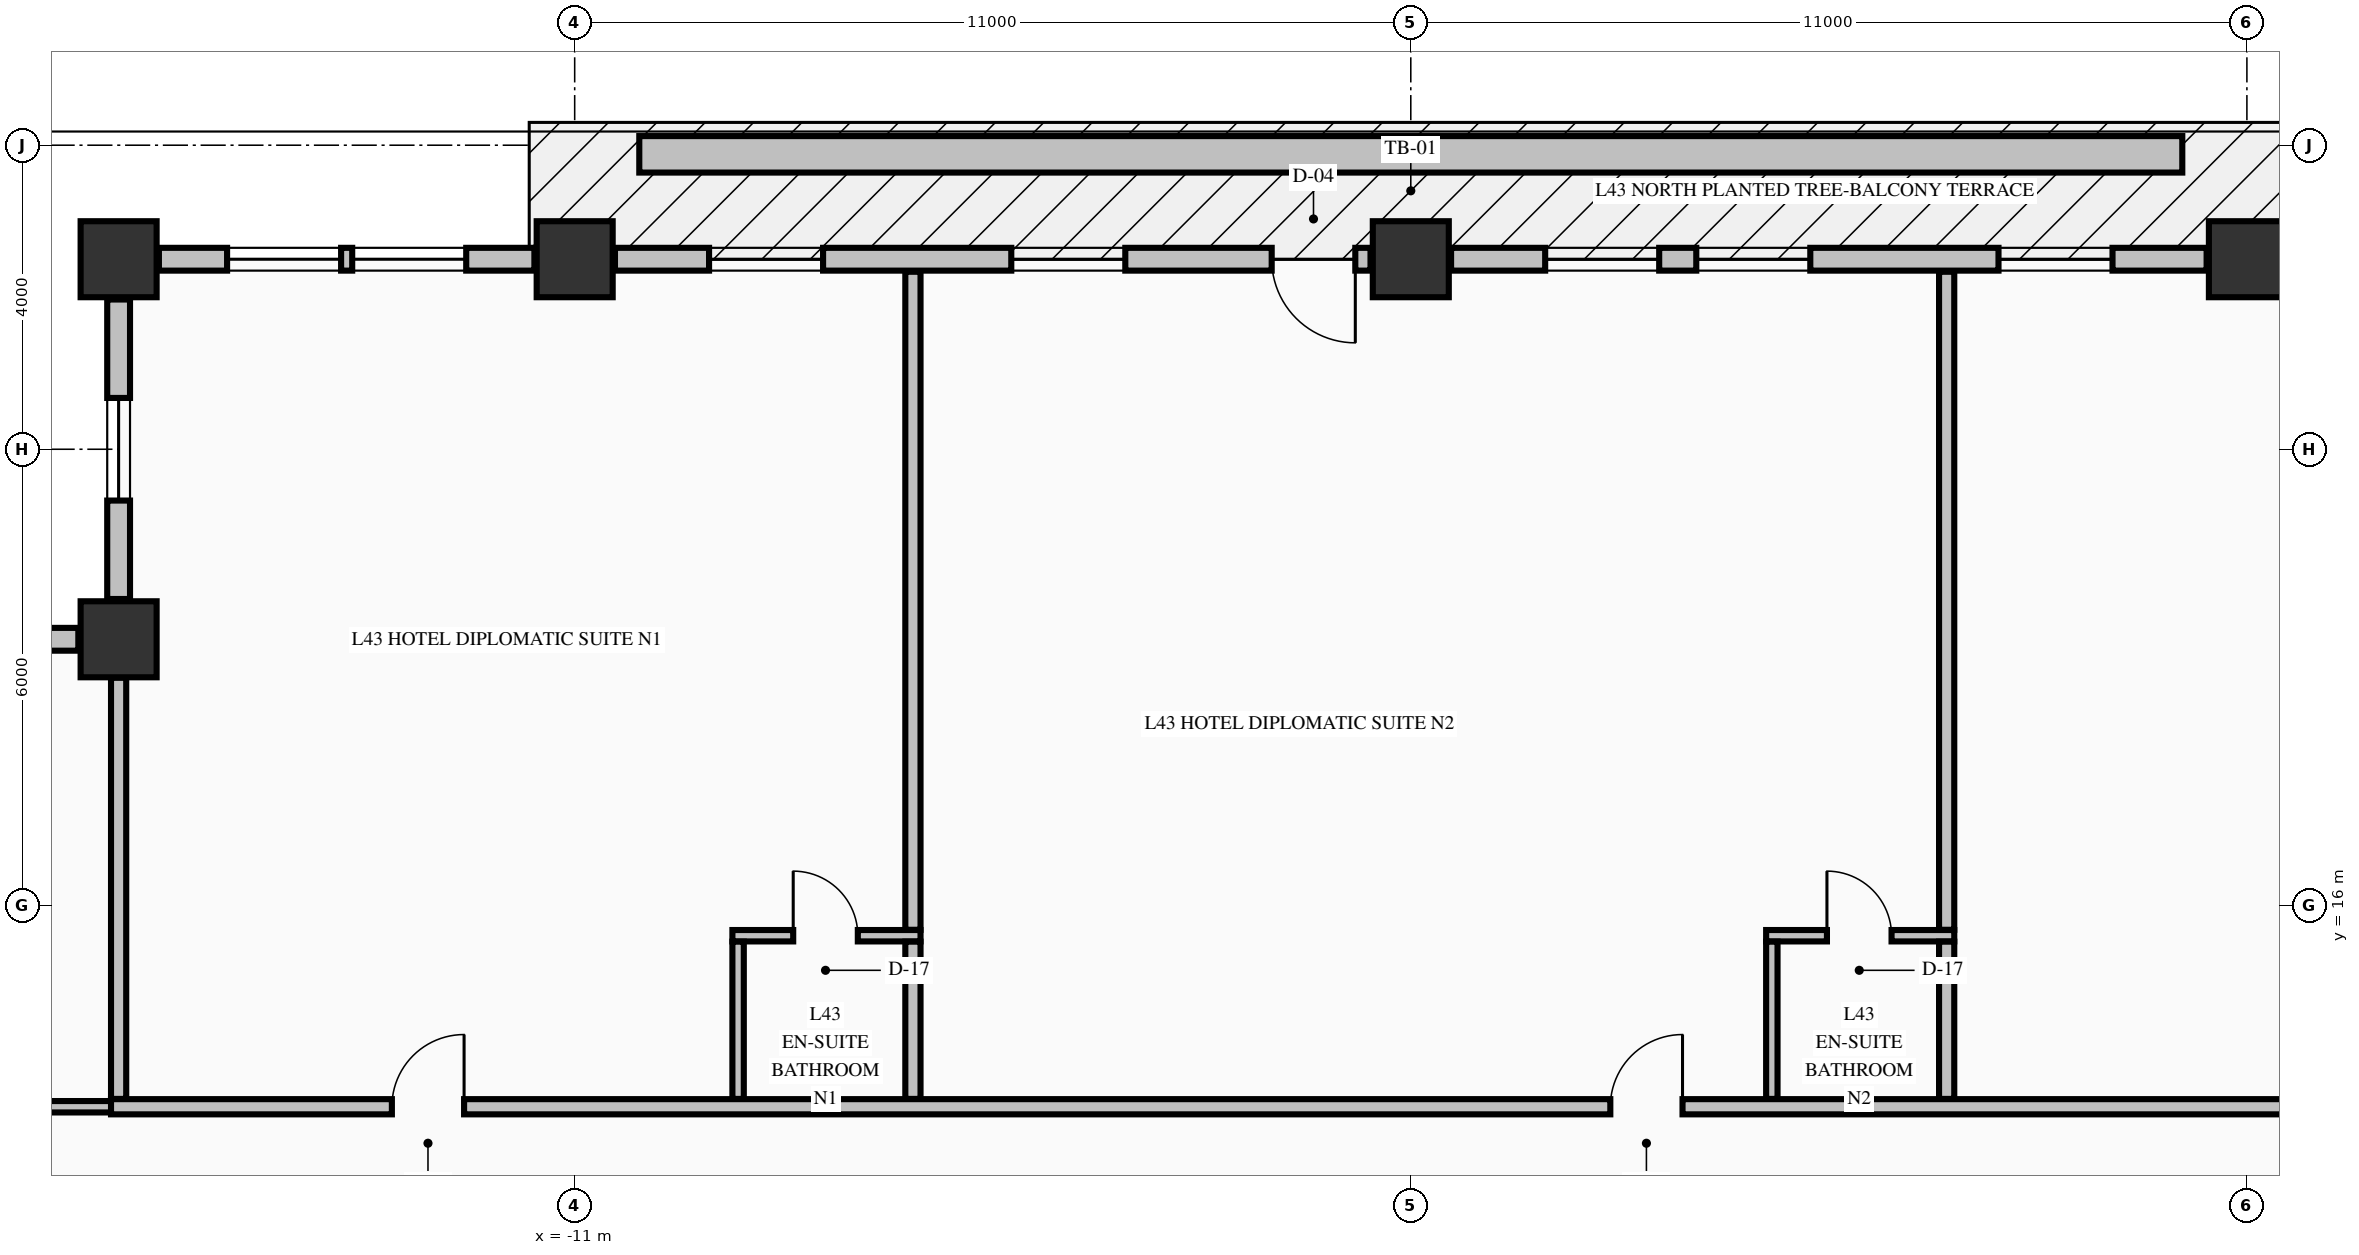
"""IFC4 building model, lengths in metres.
Left out: names, types, materials, properties, quantities, classifications, styles, units other than length and angle.
Written with IfcOpenShell. Run it as: python <this file> out.ifc"""

import sys

from ifc_helpers import new_model, si_unit, direction, frame, frame_2d, origin, origin_2d, place, context, subcontext, project, spatial, rectangle, extrude, element, fill, save


model = new_model("IFC4")
c1 = context("Model", 3, precision=1e-05, world=origin(), true_north=direction((0.0, 1.0)))
c2 = subcontext(c1, "Body", "Model", "MODEL_VIEW")
j1 = project(units=[si_unit("LENGTHUNIT", "METRE"), si_unit("PLANEANGLEUNIT", "RADIAN")], contexts=[c1])
p1 = place(None, origin())
s1 = spatial("IfcSite", under=j1, at=p1, CompositionType="ELEMENT")
p2 = place(p1, origin())
s2 = spatial("IfcBuilding", under=s1, at=p2, CompositionType="ELEMENT")
p3 = place(p2, frame((0.0, 0.0, 169.46)))
s3 = spatial("IfcBuildingStorey", under=s2, at=p3, CompositionType="ELEMENT", Elevation=169.46)
for number, where, z_axis, x_axis in (
    (1, (-17.0, 24.5, -0.25), (0.0, 0.0, 1.0), (1.0, 0.0, 0.0)),
    (2, (-11.0, 24.5, -0.25), (0.0, 0.0, 1.0), (1.0, 0.0, 0.0)),
    (3, (0.0, 24.5, -0.25), (0.0, 0.0, 1.0), (1.0, 0.0, 0.0)),
    (4, (11.0, 24.5, -0.25), (0.0, 0.0, 1.0), (1.0, 0.0, 0.0)),
    (5, (-17.0, 19.5, -0.25), (0.0, 0.0, 1.0), (1.0, 0.0, 0.0)),
):
    element("IfcColumn", number, at=place(p3, frame(where, z_axis=z_axis, x_axis=x_axis)), inside=s3, PredefinedType="COLUMN", context=c2, shape_type="SweptSolid", body=[
        extrude(rectangle(XDim=1.0, YDim=1.0, at=origin_2d()), origin(), (0.0, 0.0, 1.0), 3.4),
    ])
p4 = place(p3, frame((-17.0, 23.97, 0.0), z_axis=(0.0, 0.0, 1.0), x_axis=(0.0, -1.0, 0.0)))
e6 = element("IfcWall", 6, at=p4, inside=s3, PredefinedType="STANDARD", context=c2, shape_type="SweptSolid", body=[
    extrude(rectangle(XDim=3.94, YDim=0.3, at=frame_2d((1.97, 0.0))), origin(), (0.0, 0.0, 1.0), 2.542),
])
p5 = place(p4, frame((1.295, 0.0, 0.68)))
e7 = element("IfcOpeningElement", 7, at=p5, cuts=e6, PredefinedType="OPENING", context=c2, shape_type="SweptSolid", body=[
    extrude(rectangle(XDim=1.35, YDim=1.42, at=frame_2d((0.675, 0.71))), frame((0.0, 0.16, 0.0), z_axis=(0.0, -1.0, 0.0), x_axis=(1.0, 0.0, 0.0)), (0.0, 0.0, 1.0), 0.32),
])
p6 = place(p3, frame((-17.53, 19.5, 0.0), z_axis=(0.0, 0.0, 1.0), x_axis=(-1.0, 0.0, 0.0)))
e8 = element("IfcWall", 8, at=p6, inside=s3, PredefinedType="STANDARD", context=c2, shape_type="SweptSolid", body=[
    extrude(rectangle(XDim=3.94, YDim=0.3, at=frame_2d((1.97, 0.0))), origin(), (0.0, 0.0, 1.0), 2.542),
])
p7 = place(p6, frame((1.295, 0.0, 0.68)))
e9 = element("IfcOpeningElement", 9, at=p7, cuts=e8, PredefinedType="OPENING", context=c2, shape_type="SweptSolid", body=[
    extrude(rectangle(XDim=1.35, YDim=1.42, at=frame_2d((0.675, 0.71))), frame((0.0, 0.16, 0.0), z_axis=(0.0, -1.0, 0.0), x_axis=(1.0, 0.0, 0.0)), (0.0, 0.0, 1.0), 0.32),
])
p8 = place(p3, frame((-11.53, 24.5, 0.0), z_axis=(0.0, 0.0, 1.0), x_axis=(-1.0, 0.0, 0.0)))
e10 = element("IfcWall", 10, at=p8, inside=s3, PredefinedType="STANDARD", context=c2, shape_type="SweptSolid", body=[
    extrude(rectangle(XDim=4.94, YDim=0.3, at=frame_2d((2.47, 0.0))), origin(), (0.0, 0.0, 1.0), 2.542),
])
p9 = place(p8, frame((0.897, 0.0, 0.72)))
e11 = element("IfcOpeningElement", 11, at=p9, cuts=e10, PredefinedType="OPENING", context=c2, shape_type="SweptSolid", body=[
    extrude(rectangle(XDim=1.5, YDim=1.6, at=frame_2d((0.75, 0.8))), frame((0.0, 0.16, 0.0), z_axis=(0.0, -1.0, 0.0), x_axis=(1.0, 0.0, 0.0)), (0.0, 0.0, 1.0), 0.32),
])
p10 = place(p8, frame((2.543, 0.0, 0.72)))
e12 = element("IfcOpeningElement", 12, at=p10, cuts=e10, PredefinedType="OPENING", context=c2, shape_type="SweptSolid", body=[
    extrude(rectangle(XDim=1.5, YDim=1.6, at=frame_2d((0.75, 0.8))), frame((0.0, 0.16, 0.0), z_axis=(0.0, -1.0, 0.0), x_axis=(1.0, 0.0, 0.0)), (0.0, 0.0, 1.0), 0.32),
])
p11 = place(p3, frame((-0.53, 24.5, 0.0), z_axis=(0.0, 0.0, 1.0), x_axis=(-1.0, 0.0, 0.0)))
e13 = element("IfcWall", 13, at=p11, inside=s3, PredefinedType="STANDARD", context=c2, shape_type="SweptSolid", body=[
    extrude(rectangle(XDim=9.94, YDim=0.3, at=frame_2d((4.97, 0.0))), origin(), (0.0, 0.0, 1.0), 2.542),
])
p12 = place(p11, frame((0.2, 0.0, 0.0)))
e14 = element("IfcOpeningElement", 14, at=p12, cuts=e13, PredefinedType="OPENING", context=c2, shape_type="SweptSolid", body=[
    extrude(rectangle(XDim=1.1, YDim=2.15, at=frame_2d((0.55, 1.075))), frame((0.0, 0.16, 0.0), z_axis=(0.0, -1.0, 0.0), x_axis=(1.0, 0.0, 0.0)), (0.0, 0.0, 1.0), 0.32),
])
p13 = place(p11, frame((3.226, 0.0, 0.72)))
e15 = element("IfcOpeningElement", 15, at=p13, cuts=e13, PredefinedType="OPENING", context=c2, shape_type="SweptSolid", body=[
    extrude(rectangle(XDim=1.5, YDim=1.6, at=frame_2d((0.75, 0.8))), frame((0.0, 0.16, 0.0), z_axis=(0.0, -1.0, 0.0), x_axis=(1.0, 0.0, 0.0)), (0.0, 0.0, 1.0), 0.32),
])
p14 = place(p11, frame((7.202, 0.0, 0.72)))
e16 = element("IfcOpeningElement", 16, at=p14, cuts=e13, PredefinedType="OPENING", context=c2, shape_type="SweptSolid", body=[
    extrude(rectangle(XDim=1.5, YDim=1.6, at=frame_2d((0.75, 0.8))), frame((0.0, 0.16, 0.0), z_axis=(0.0, -1.0, 0.0), x_axis=(1.0, 0.0, 0.0)), (0.0, 0.0, 1.0), 0.32),
])
p15 = place(p3, frame((10.47, 24.5, 0.0), z_axis=(0.0, 0.0, 1.0), x_axis=(-1.0, 0.0, 0.0)))
e17 = element("IfcWall", 17, at=p15, inside=s3, PredefinedType="STANDARD", context=c2, shape_type="SweptSolid", body=[
    extrude(rectangle(XDim=9.94, YDim=0.3, at=frame_2d((4.97, 0.0))), origin(), (0.0, 0.0, 1.0), 2.542),
])
p16 = place(p15, frame((1.238, 0.0, 0.72)))
e18 = element("IfcOpeningElement", 18, at=p16, cuts=e17, PredefinedType="OPENING", context=c2, shape_type="SweptSolid", body=[
    extrude(rectangle(XDim=1.5, YDim=1.6, at=frame_2d((0.75, 0.8))), frame((0.0, 0.16, 0.0), z_axis=(0.0, -1.0, 0.0), x_axis=(1.0, 0.0, 0.0)), (0.0, 0.0, 1.0), 0.32),
])
p17 = place(p15, frame((5.214, 0.0, 0.72)))
e19 = element("IfcOpeningElement", 19, at=p17, cuts=e17, PredefinedType="OPENING", context=c2, shape_type="SweptSolid", body=[
    extrude(rectangle(XDim=1.5, YDim=1.6, at=frame_2d((0.75, 0.8))), frame((0.0, 0.16, 0.0), z_axis=(0.0, -1.0, 0.0), x_axis=(1.0, 0.0, 0.0)), (0.0, 0.0, 1.0), 0.32),
])
p18 = place(p15, frame((7.202, 0.0, 0.72)))
e20 = element("IfcOpeningElement", 20, at=p18, cuts=e17, PredefinedType="OPENING", context=c2, shape_type="SweptSolid", body=[
    extrude(rectangle(XDim=1.5, YDim=1.6, at=frame_2d((0.75, 0.8))), frame((0.0, 0.16, 0.0), z_axis=(0.0, -1.0, 0.0), x_axis=(1.0, 0.0, 0.0)), (0.0, 0.0, 1.0), 0.32),
])
p19 = place(p3, frame((-20.075, 13.35, 0.0), z_axis=(0.0, 0.0, 1.0), x_axis=(1.0, 0.0, 0.0)))
e21 = element("IfcWall", 21, at=p19, inside=s3, PredefinedType="PARTITIONING", context=c2, shape_type="SweptSolid", body=[
    extrude(rectangle(XDim=3.175, YDim=0.15, at=frame_2d((1.587, 0.0))), origin(), (0.0, 0.0, 1.0), 3.15),
])
p20 = place(p3, frame((-17.1, 13.35, 0.0), z_axis=(0.0, 0.0, 1.0), x_axis=(1.0, 0.0, 0.0)))
e22 = element("IfcWall", 22, at=p20, inside=s3, PredefinedType="PARTITIONING", context=c2, shape_type="SweptSolid", body=[
    extrude(rectangle(XDim=39.2, YDim=0.2, at=frame_2d((19.6, 0.0))), origin(), (0.0, 0.0, 1.0), 3.15),
])
p21 = place(p20, frame((3.695, 0.0, 0.0)))
e23 = element("IfcOpeningElement", 23, at=p21, cuts=e22, PredefinedType="OPENING", context=c2, shape_type="SweptSolid", body=[
    extrude(rectangle(XDim=0.95, YDim=2.15, at=frame_2d((0.475, 1.075))), frame((0.0, 0.11, 0.0), z_axis=(0.0, -1.0, 0.0), x_axis=(1.0, 0.0, 0.0)), (0.0, 0.0, 1.0), 0.22),
])
p22 = place(p20, frame((19.725, 0.0, 0.0)))
e24 = element("IfcOpeningElement", 24, at=p22, cuts=e22, PredefinedType="OPENING", context=c2, shape_type="SweptSolid", body=[
    extrude(rectangle(XDim=0.95, YDim=2.15, at=frame_2d((0.475, 1.075))), frame((0.0, 0.11, 0.0), z_axis=(0.0, -1.0, 0.0), x_axis=(1.0, 0.0, 0.0)), (0.0, 0.0, 1.0), 0.22),
])
p23 = place(p20, frame((30.005, 0.0, 0.0)))
e25 = element("IfcOpeningElement", 25, at=p23, cuts=e22, PredefinedType="OPENING", context=c2, shape_type="SweptSolid", body=[
    extrude(rectangle(XDim=0.95, YDim=2.15, at=frame_2d((0.475, 1.075))), frame((0.0, 0.11, 0.0), z_axis=(0.0, -1.0, 0.0), x_axis=(1.0, 0.0, 0.0)), (0.0, 0.0, 1.0), 0.22),
])
p24 = place(p3, frame((-8.925, 15.6, 0.0), z_axis=(0.0, 0.0, 1.0), x_axis=(1.0, 0.0, 0.0)))
e26 = element("IfcWall", 26, at=p24, inside=s3, PredefinedType="PARTITIONING", context=c2, shape_type="SweptSolid", body=[
    extrude(rectangle(XDim=2.475, YDim=0.15, at=frame_2d((1.238, 0.0))), origin(), (0.0, 0.0, 1.0), 3.15),
])
p25 = place(p24, frame((0.8, 0.0, 0.0)))
e27 = element("IfcOpeningElement", 27, at=p25, cuts=e26, PredefinedType="OPENING", context=c2, shape_type="SweptSolid", body=[
    extrude(rectangle(XDim=0.85, YDim=2.1, at=frame_2d((0.425, 1.05))), frame((0.0, 0.085, 0.0), z_axis=(0.0, -1.0, 0.0), x_axis=(1.0, 0.0, 0.0)), (0.0, 0.0, 1.0), 0.17),
])
p26 = place(p3, frame((4.675, 15.6, 0.0), z_axis=(0.0, 0.0, 1.0), x_axis=(1.0, 0.0, 0.0)))
e28 = element("IfcWall", 28, at=p26, inside=s3, PredefinedType="PARTITIONING", context=c2, shape_type="SweptSolid", body=[
    extrude(rectangle(XDim=2.475, YDim=0.15, at=frame_2d((1.237, 0.0))), origin(), (0.0, 0.0, 1.0), 3.15),
])
p27 = place(p26, frame((0.8, 0.0, 0.0)))
e29 = element("IfcOpeningElement", 29, at=p27, cuts=e28, PredefinedType="OPENING", context=c2, shape_type="SweptSolid", body=[
    extrude(rectangle(XDim=0.85, YDim=2.1, at=frame_2d((0.425, 1.05))), frame((0.0, 0.085, 0.0), z_axis=(0.0, -1.0, 0.0), x_axis=(1.0, 0.0, 0.0)), (0.0, 0.0, 1.0), 0.17),
])
p28 = place(p3, frame((-17.0, 13.453, 0.0), z_axis=(0.0, 0.0, 1.0), x_axis=(0.0, 1.0, 0.0)))
e30 = element("IfcWall", 30, at=p28, inside=s3, PredefinedType="PARTITIONING", context=c2, shape_type="SweptSolid", body=[
    extrude(rectangle(XDim=5.541, YDim=0.2, at=frame_2d((2.771, 0.0))), origin(), (0.0, 0.0, 1.0), 3.15),
])
p29 = place(p3, frame((-8.85, 13.453, 0.0), z_axis=(0.0, 0.0, 1.0), x_axis=(0.0, 1.0, 0.0)))
e31 = element("IfcWall", 31, at=p29, inside=s3, PredefinedType="PARTITIONING", context=c2, shape_type="SweptSolid", body=[
    extrude(rectangle(XDim=2.069, YDim=0.15, at=frame_2d((1.035, 0.0))), origin(), (0.0, 0.0, 1.0), 3.15),
])
p30 = place(p3, frame((-6.55, 13.453, 0.0), z_axis=(0.0, 0.0, 1.0), x_axis=(0.0, 1.0, 0.0)))
e32 = element("IfcWall", 32, at=p30, inside=s3, PredefinedType="PARTITIONING", context=c2, shape_type="SweptSolid", body=[
    extrude(rectangle(XDim=2.069, YDim=0.2, at=frame_2d((1.035, 0.0))), origin(), (0.0, 0.0, 1.0), 3.15),
])
p31 = place(p3, frame((-6.55, 15.678, 0.0), z_axis=(0.0, 0.0, 1.0), x_axis=(0.0, 1.0, 0.0)))
e33 = element("IfcWall", 33, at=p31, inside=s3, PredefinedType="PARTITIONING", context=c2, shape_type="SweptSolid", body=[
    extrude(rectangle(XDim=8.657, YDim=0.2, at=frame_2d((4.329, 0.0))), origin(), (0.0, 0.0, 1.0), 3.15),
])
p32 = place(p3, frame((4.75, 13.453, 0.0), z_axis=(0.0, 0.0, 1.0), x_axis=(0.0, 1.0, 0.0)))
e34 = element("IfcWall", 34, at=p32, inside=s3, PredefinedType="PARTITIONING", context=c2, shape_type="SweptSolid", body=[
    extrude(rectangle(XDim=2.069, YDim=0.15, at=frame_2d((1.035, 0.0))), origin(), (0.0, 0.0, 1.0), 3.15),
])
p33 = place(p3, frame((7.05, 13.453, 0.0), z_axis=(0.0, 0.0, 1.0), x_axis=(0.0, 1.0, 0.0)))
e35 = element("IfcWall", 35, at=p33, inside=s3, PredefinedType="PARTITIONING", context=c2, shape_type="SweptSolid", body=[
    extrude(rectangle(XDim=2.069, YDim=0.2, at=frame_2d((1.035, 0.0))), origin(), (0.0, 0.0, 1.0), 3.15),
])
p34 = place(p3, frame((7.05, 15.678, 0.0), z_axis=(0.0, 0.0, 1.0), x_axis=(0.0, 1.0, 0.0)))
e36 = element("IfcWall", 36, at=p34, inside=s3, PredefinedType="PARTITIONING", context=c2, shape_type="SweptSolid", body=[
    extrude(rectangle(XDim=8.657, YDim=0.2, at=frame_2d((4.329, 0.0))), origin(), (0.0, 0.0, 1.0), 3.15),
])
p35 = place(p3, frame((-10.15, 25.88, -0.04), z_axis=(0.0, 0.0, 1.0), x_axis=(1.0, 0.0, 0.0)))
e37 = element("IfcWall", 37, at=p35, inside=s3, PredefinedType="PARAPET", context=c2, shape_type="SweptSolid", body=[
    extrude(rectangle(XDim=20.3, YDim=0.48, at=frame_2d((10.15, 0.0))), origin(), (0.0, 0.0, 1.0), 0.52),
])
p36 = place(p5, origin())
e38 = element("IfcWindow", 38, at=p36, inside=s3, PartitioningType="SINGLE_PANEL", PredefinedType="WINDOW", context=c2, shape_type="SweptSolid", body=[
    extrude(rectangle(XDim=1.35, YDim=1.42, at=frame_2d((0.675, 0.71))), frame((0.0, 0.03, 0.0), z_axis=(0.0, -1.0, 0.0), x_axis=(1.0, 0.0, 0.0)), (0.0, 0.0, 1.0), 0.06),
])
fill(e7, e38)
p37 = place(p9, origin())
e39 = element("IfcWindow", 39, at=p37, inside=s3, PartitioningType="SINGLE_PANEL", PredefinedType="WINDOW", context=c2, shape_type="SweptSolid", body=[
    extrude(rectangle(XDim=1.5, YDim=1.6, at=frame_2d((0.75, 0.8))), frame((0.0, 0.03, 0.0), z_axis=(0.0, -1.0, 0.0), x_axis=(1.0, 0.0, 0.0)), (0.0, 0.0, 1.0), 0.06),
])
fill(e11, e39)
p38 = place(p10, origin())
e40 = element("IfcWindow", 40, at=p38, inside=s3, PartitioningType="SINGLE_PANEL", PredefinedType="WINDOW", context=c2, shape_type="SweptSolid", body=[
    extrude(rectangle(XDim=1.5, YDim=1.6, at=frame_2d((0.75, 0.8))), frame((0.0, 0.03, 0.0), z_axis=(0.0, -1.0, 0.0), x_axis=(1.0, 0.0, 0.0)), (0.0, 0.0, 1.0), 0.06),
])
fill(e12, e40)
p39 = place(p12, origin())
e41 = element("IfcDoor", 41, at=p39, inside=s3, OperationType="SINGLE_SWING_LEFT", PredefinedType="DOOR", context=c2, shape_type="SweptSolid", body=[
    extrude(rectangle(XDim=1.1, YDim=2.15, at=frame_2d((0.55, 1.075))), frame((0.0, 0.025, 0.0), z_axis=(0.0, -1.0, 0.0), x_axis=(1.0, 0.0, 0.0)), (0.0, 0.0, 1.0), 0.05),
])
fill(e14, e41)
p40 = place(p13, origin())
e42 = element("IfcWindow", 42, at=p40, inside=s3, PartitioningType="SINGLE_PANEL", PredefinedType="WINDOW", context=c2, shape_type="SweptSolid", body=[
    extrude(rectangle(XDim=1.5, YDim=1.6, at=frame_2d((0.75, 0.8))), frame((0.0, 0.03, 0.0), z_axis=(0.0, -1.0, 0.0), x_axis=(1.0, 0.0, 0.0)), (0.0, 0.0, 1.0), 0.06),
])
fill(e15, e42)
p41 = place(p14, origin())
e43 = element("IfcWindow", 43, at=p41, inside=s3, PartitioningType="SINGLE_PANEL", PredefinedType="WINDOW", context=c2, shape_type="SweptSolid", body=[
    extrude(rectangle(XDim=1.5, YDim=1.6, at=frame_2d((0.75, 0.8))), frame((0.0, 0.03, 0.0), z_axis=(0.0, -1.0, 0.0), x_axis=(1.0, 0.0, 0.0)), (0.0, 0.0, 1.0), 0.06),
])
fill(e16, e43)
p42 = place(p16, origin())
e44 = element("IfcWindow", 44, at=p42, inside=s3, PartitioningType="SINGLE_PANEL", PredefinedType="WINDOW", context=c2, shape_type="SweptSolid", body=[
    extrude(rectangle(XDim=1.5, YDim=1.6, at=frame_2d((0.75, 0.8))), frame((0.0, 0.03, 0.0), z_axis=(0.0, -1.0, 0.0), x_axis=(1.0, 0.0, 0.0)), (0.0, 0.0, 1.0), 0.06),
])
fill(e18, e44)
p43 = place(p17, origin())
e45 = element("IfcWindow", 45, at=p43, inside=s3, PartitioningType="SINGLE_PANEL", PredefinedType="WINDOW", context=c2, shape_type="SweptSolid", body=[
    extrude(rectangle(XDim=1.5, YDim=1.6, at=frame_2d((0.75, 0.8))), frame((0.0, 0.03, 0.0), z_axis=(0.0, -1.0, 0.0), x_axis=(1.0, 0.0, 0.0)), (0.0, 0.0, 1.0), 0.06),
])
fill(e19, e45)
p44 = place(p18, origin())
e46 = element("IfcWindow", 46, at=p44, inside=s3, PartitioningType="SINGLE_PANEL", PredefinedType="WINDOW", context=c2, shape_type="SweptSolid", body=[
    extrude(rectangle(XDim=1.5, YDim=1.6, at=frame_2d((0.75, 0.8))), frame((0.0, 0.03, 0.0), z_axis=(0.0, -1.0, 0.0), x_axis=(1.0, 0.0, 0.0)), (0.0, 0.0, 1.0), 0.06),
])
fill(e20, e46)
p45 = place(p21, origin())
e47 = element("IfcDoor", 47, at=p45, inside=s3, OperationType="SINGLE_SWING_RIGHT", PredefinedType="DOOR", context=c2, shape_type="SweptSolid", body=[
    extrude(rectangle(XDim=0.95, YDim=2.15, at=frame_2d((0.475, 1.075))), frame((0.0, 0.025, 0.0), z_axis=(0.0, -1.0, 0.0), x_axis=(1.0, 0.0, 0.0)), (0.0, 0.0, 1.0), 0.05),
])
fill(e23, e47)
p46 = place(p25, origin())
e48 = element("IfcDoor", 48, at=p46, inside=s3, OperationType="SINGLE_SWING_LEFT", PredefinedType="DOOR", context=c2, shape_type="SweptSolid", body=[
    extrude(rectangle(XDim=0.85, YDim=2.1, at=frame_2d((0.425, 1.05))), frame((0.0, 0.025, 0.0), z_axis=(0.0, -1.0, 0.0), x_axis=(1.0, 0.0, 0.0)), (0.0, 0.0, 1.0), 0.05),
])
fill(e27, e48)
p47 = place(p22, origin())
e49 = element("IfcDoor", 49, at=p47, inside=s3, OperationType="SINGLE_SWING_RIGHT", PredefinedType="DOOR", context=c2, shape_type="SweptSolid", body=[
    extrude(rectangle(XDim=0.95, YDim=2.15, at=frame_2d((0.475, 1.075))), frame((0.0, 0.025, 0.0), z_axis=(0.0, -1.0, 0.0), x_axis=(1.0, 0.0, 0.0)), (0.0, 0.0, 1.0), 0.05),
])
fill(e24, e49)
p48 = place(p27, origin())
e50 = element("IfcDoor", 50, at=p48, inside=s3, OperationType="SINGLE_SWING_LEFT", PredefinedType="DOOR", context=c2, shape_type="SweptSolid", body=[
    extrude(rectangle(XDim=0.85, YDim=2.1, at=frame_2d((0.425, 1.05))), frame((0.0, 0.025, 0.0), z_axis=(0.0, -1.0, 0.0), x_axis=(1.0, 0.0, 0.0)), (0.0, 0.0, 1.0), 0.05),
])
fill(e29, e50)
save(model, sys.argv[1])
